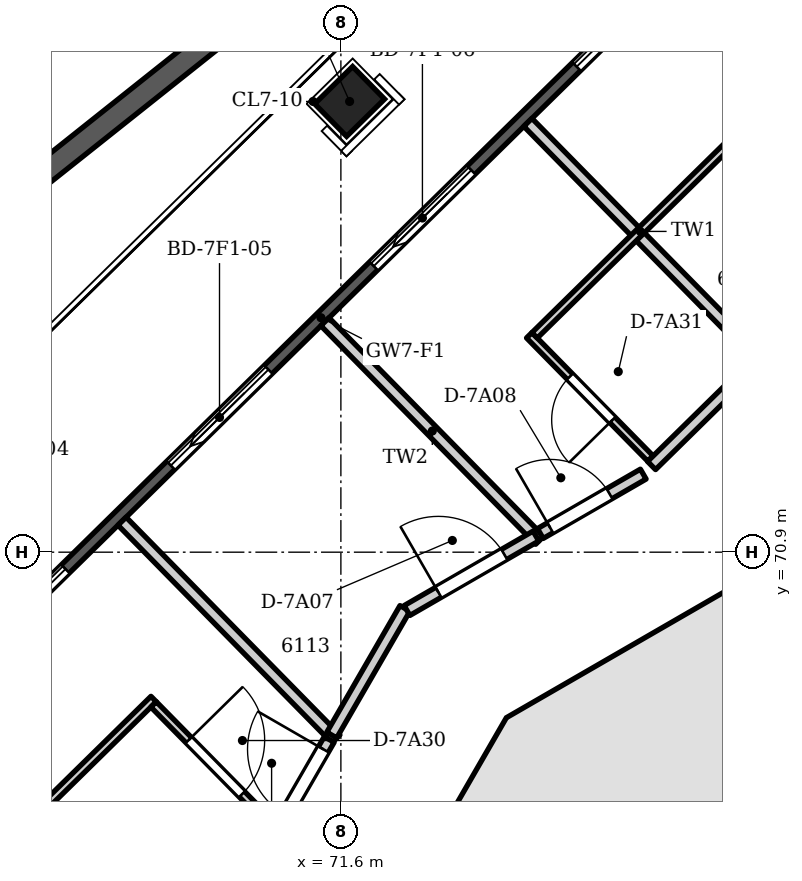
"""IFC4 building model, lengths in metres.
Left out: names, types, materials, properties, quantities, classifications, styles, units other than length and angle.
Written with IfcOpenShell. Run it as: python <this file> out.ifc"""

import sys

from ifc_helpers import new_model, si_unit, direction, frame, frame_2d, origin, origin_2d, place, context, subcontext, project, spatial, polyline, rectangle, outline, extrude, element, fill, save


model = new_model("IFC4")
c1 = context("Model", 3, precision=1e-05, world=origin(), true_north=direction((0.0, 1.0)))
c2 = subcontext(c1, "Body", "Model", "MODEL_VIEW")
j1 = project(units=[si_unit("LENGTHUNIT", "METRE"), si_unit("PLANEANGLEUNIT", "RADIAN")], contexts=[c1])
p1 = place(None, origin())
s1 = spatial("IfcSite", under=j1, at=p1, CompositionType="ELEMENT")
p2 = place(p1, origin())
s2 = spatial("IfcBuilding", under=s1, at=p2, CompositionType="ELEMENT")
p3 = place(p2, frame((0.0, 0.0, 234.9)))
s3 = spatial("IfcBuildingStorey", under=s2, at=p3, CompositionType="ELEMENT", Elevation=234.9)
p4 = place(p3, frame((77.897, 70.697, 0.0), z_axis=(0.0, 0.0, 1.0), x_axis=(-0.866034756103, -0.499983800959, 0.0)))
e1 = element("IfcWall", 1, at=p4, inside=s3, PredefinedType="SHEAR", context=c2, shape_type="SweptSolid", body=[
    extrude(outline(polyline([(0.0, -0.35), (4.555, -0.35), (4.368, 0.35), (0.188, 0.35), (0.0, -0.35)])), origin(), (0.0, 0.0, 1.0), 3.6),
])
p5 = place(p4, frame((0.642, 0.0, 0.0)))
e2 = element("IfcOpeningElement", 2, at=p5, cuts=e1, PredefinedType="OPENING", context=c2, shape_type="SweptSolid", body=[
    extrude(rectangle(XDim=0.9, YDim=2.1, at=frame_2d((0.45, 1.05))), frame((0.0, 0.36, 0.0), z_axis=(0.0, -1.0, 0.0), x_axis=(1.0, 0.0, 0.0)), (0.0, 0.0, 1.0), 0.72),
])
p6 = place(p3, frame((74.081, 68.548, 0.0), z_axis=(0.0, 0.0, 1.0), x_axis=(-0.499983800959, -0.866034756103, 0.0)))
e3 = element("IfcWall", 3, at=p6, inside=s3, PredefinedType="SHEAR", context=c2, shape_type="SweptSolid", body=[
    extrude(outline(polyline([(0.0, -0.35), (4.555, -0.35), (4.368, 0.35), (0.188, 0.35), (0.0, -0.35)])), origin(), (0.0, 0.0, 1.0), 3.6),
])
p7 = place(p6, frame((1.077, 0.0, 0.0)))
e4 = element("IfcOpeningElement", 4, at=p7, cuts=e3, PredefinedType="OPENING", context=c2, shape_type="SweptSolid", body=[
    extrude(rectangle(XDim=2.4, YDim=2.1, at=frame_2d((1.2, 1.05))), frame((0.0, 0.36, 0.0), z_axis=(0.0, -1.0, 0.0), x_axis=(1.0, 0.0, 0.0)), (0.0, 0.0, 1.0), 0.72),
])
p8 = place(p3, frame((77.731, 65.369, 0.0), z_axis=(0.0, 0.0, 1.0), x_axis=(-0.866035918664, 0.499981787252, 0.0)))
e5 = element("IfcWall", 5, at=p8, inside=s3, PredefinedType="SHEAR", context=c2, shape_type="SweptSolid", body=[
    extrude(rectangle(XDim=4.401, YDim=0.3, at=frame_2d((2.2, 0.0))), origin(), (0.0, 0.0, 1.0), 3.6),
])
p9 = place(p8, frame((1.351, 0.0, 0.0)))
e6 = element("IfcOpeningElement", 6, at=p9, cuts=e5, PredefinedType="OPENING", context=c2, shape_type="SweptSolid", body=[
    extrude(rectangle(XDim=1.0, YDim=2.1, at=frame_2d((0.5, 1.05))), frame((0.0, 0.16, 0.0), z_axis=(0.0, -1.0, 0.0), x_axis=(1.0, 0.0, 0.0)), (0.0, 0.0, 1.0), 0.32),
])
p10 = place(p3, frame((71.715, 76.83, -0.35), z_axis=(0.0, 0.0, 1.0), x_axis=(0.713250449154, 0.7009092643, 0.0)))
e7 = element("IfcColumn", 7, at=p10, inside=s3, PredefinedType="COLUMN", context=c2, shape_type="SweptSolid", body=[
    extrude(rectangle(XDim=0.7, YDim=0.6, at=origin_2d()), origin(), (0.0, 0.0, 1.0), 3.95),
])
p11 = place(p3, frame((57.99, 60.867, 0.0), z_axis=(0.0, 0.0, 1.0), x_axis=(0.713254682671, 0.700904956216, 0.0)))
e8 = element("IfcWall", 8, at=p11, inside=s3, PredefinedType="SOLIDWALL", context=c2, shape_type="SweptSolid", body=[
    extrude(outline(polyline([(0.149, 0.075), (0.149, -0.075), (33.537, -0.075), (33.537, 0.075), (0.149, 0.075)])), origin(), (0.0, 0.0, 1.0), 3.3),
])
p12 = place(p11, frame((1.171, 0.0, 0.0)))
e9 = element("IfcOpeningElement", 9, at=p12, cuts=e8, PredefinedType="OPENING", context=c2, shape_type="SweptSolid", body=[
    extrude(rectangle(XDim=1.8, YDim=2.6, at=frame_2d((0.9, 1.3))), frame((0.0, 0.085, 0.0), z_axis=(0.0, -1.0, 0.0), x_axis=(1.0, 0.0, 0.0)), (0.0, 0.0, 1.0), 0.17),
])
p13 = place(p11, frame((4.714, 0.0, 0.0)))
e10 = element("IfcOpeningElement", 10, at=p13, cuts=e8, PredefinedType="OPENING", context=c2, shape_type="SweptSolid", body=[
    extrude(rectangle(XDim=1.8, YDim=2.6, at=frame_2d((0.9, 1.3))), frame((0.0, 0.085, 0.0), z_axis=(0.0, -1.0, 0.0), x_axis=(1.0, 0.0, 0.0)), (0.0, 0.0, 1.0), 0.17),
])
p14 = place(p11, frame((8.457, 0.0, 0.0)))
e11 = element("IfcOpeningElement", 11, at=p14, cuts=e8, PredefinedType="OPENING", context=c2, shape_type="SweptSolid", body=[
    extrude(rectangle(XDim=1.8, YDim=2.6, at=frame_2d((0.9, 1.3))), frame((0.0, 0.085, 0.0), z_axis=(0.0, -1.0, 0.0), x_axis=(1.0, 0.0, 0.0)), (0.0, 0.0, 1.0), 0.17),
])
p15 = place(p11, frame((12.2, 0.0, 0.0)))
e12 = element("IfcOpeningElement", 12, at=p15, cuts=e8, PredefinedType="OPENING", context=c2, shape_type="SweptSolid", body=[
    extrude(rectangle(XDim=1.8, YDim=2.6, at=frame_2d((0.9, 1.3))), frame((0.0, 0.085, 0.0), z_axis=(0.0, -1.0, 0.0), x_axis=(1.0, 0.0, 0.0)), (0.0, 0.0, 1.0), 0.17),
])
p16 = place(p11, frame((15.943, 0.0, 0.0)))
e13 = element("IfcOpeningElement", 13, at=p16, cuts=e8, PredefinedType="OPENING", context=c2, shape_type="SweptSolid", body=[
    extrude(rectangle(XDim=1.8, YDim=2.6, at=frame_2d((0.9, 1.3))), frame((0.0, 0.085, 0.0), z_axis=(0.0, -1.0, 0.0), x_axis=(1.0, 0.0, 0.0)), (0.0, 0.0, 1.0), 0.17),
])
p17 = place(p11, frame((19.686, 0.0, 0.0)))
e14 = element("IfcOpeningElement", 14, at=p17, cuts=e8, PredefinedType="OPENING", context=c2, shape_type="SweptSolid", body=[
    extrude(rectangle(XDim=1.8, YDim=2.6, at=frame_2d((0.9, 1.3))), frame((0.0, 0.085, 0.0), z_axis=(0.0, -1.0, 0.0), x_axis=(1.0, 0.0, 0.0)), (0.0, 0.0, 1.0), 0.17),
])
p18 = place(p11, frame((23.429, 0.0, 0.0)))
e15 = element("IfcOpeningElement", 15, at=p18, cuts=e8, PredefinedType="OPENING", context=c2, shape_type="SweptSolid", body=[
    extrude(rectangle(XDim=1.8, YDim=2.6, at=frame_2d((0.9, 1.3))), frame((0.0, 0.085, 0.0), z_axis=(0.0, -1.0, 0.0), x_axis=(1.0, 0.0, 0.0)), (0.0, 0.0, 1.0), 0.17),
])
p19 = place(p11, frame((27.172, 0.0, 0.0)))
e16 = element("IfcOpeningElement", 16, at=p19, cuts=e8, PredefinedType="OPENING", context=c2, shape_type="SweptSolid", body=[
    extrude(rectangle(XDim=1.8, YDim=2.6, at=frame_2d((0.9, 1.3))), frame((0.0, 0.085, 0.0), z_axis=(0.0, -1.0, 0.0), x_axis=(1.0, 0.0, 0.0)), (0.0, 0.0, 1.0), 0.17),
])
p20 = place(p11, frame((30.715, 0.0, 0.0)))
e17 = element("IfcOpeningElement", 17, at=p20, cuts=e8, PredefinedType="OPENING", context=c2, shape_type="SweptSolid", body=[
    extrude(rectangle(XDim=1.8, YDim=2.6, at=frame_2d((0.9, 1.3))), frame((0.0, 0.085, 0.0), z_axis=(0.0, -1.0, 0.0), x_axis=(1.0, 0.0, 0.0)), (0.0, 0.0, 1.0), 0.17),
])
p21 = place(p3, origin())
e18 = element("IfcWall", 18, at=p21, inside=s3, PredefinedType="PARAPET", context=c2, shape_type="SweptSolid", body=[
    extrude(outline(polyline([(80.313, 86.12), (49.243, 61.406), (49.565, 61.279), (78.266, 84.108), (80.313, 86.12)])), origin(), (0.0, 0.0, 1.0), 1.1),
])
p22 = place(p3, frame((66.051, 68.685, 0.0), z_axis=(0.0, 0.0, 1.0), x_axis=(0.700808262034, -0.713349689748, 0.0)))
e19 = element("IfcWall", 19, at=p22, inside=s3, PredefinedType="PARTITIONING", context=c2, shape_type="SweptSolid", body=[
    extrude(rectangle(XDim=4.361, YDim=0.15, at=frame_2d((2.18, 0.0))), origin(), (0.0, 0.0, 1.0), 3.3),
])
p23 = place(p3, frame((67.479, 67.339, 0.0), z_axis=(0.0, 0.0, 1.0), x_axis=(0.713275639023, 0.700883629982, 0.0)))
e20 = element("IfcWall", 20, at=p23, inside=s3, PredefinedType="PARTITIONING", context=c2, shape_type="SweptSolid", body=[
    extrude(rectangle(XDim=2.325, YDim=0.1, at=frame_2d((1.162, 0.0))), origin(), (0.0, 0.0, 1.0), 3.3),
])
p24 = place(p3, frame((68.721, 71.308, 0.0), z_axis=(0.0, 0.0, 1.0), x_axis=(0.700815785944, -0.713342298039, 0.0)))
e21 = element("IfcWall", 21, at=p24, inside=s3, PredefinedType="PARTITIONING", context=c2, shape_type="SweptSolid", body=[
    extrude(rectangle(XDim=4.015, YDim=0.15, at=frame_2d((2.007, 0.0))), origin(), (0.0, 0.0, 1.0), 3.3),
])
p25 = place(p3, frame((69.136, 68.897, 0.0), z_axis=(0.0, 0.0, 1.0), x_axis=(0.701179250169, -0.712985034297, 0.0)))
e22 = element("IfcWall", 22, at=p25, inside=s3, PredefinedType="PARTITIONING", context=c2, shape_type="SweptSolid", body=[
    extrude(rectangle(XDim=2.316, YDim=0.1, at=frame_2d((1.158, 0.0))), origin(), (0.0, 0.0, 1.0), 3.3),
])
p26 = place(p25, frame((0.658, 0.0, 0.0)))
e23 = element("IfcOpeningElement", 23, at=p26, cuts=e22, PredefinedType="OPENING", context=c2, shape_type="SweptSolid", body=[
    extrude(rectangle(XDim=1.0, YDim=2.1, at=frame_2d((0.5, 1.05))), frame((0.0, 0.06, 0.0), z_axis=(0.0, -1.0, 0.0), x_axis=(1.0, 0.0, 0.0)), (0.0, 0.0, 1.0), 0.12),
])
p27 = place(p3, frame((70.758, 67.243, 0.0), z_axis=(0.0, 0.0, 1.0), x_axis=(0.49979916758, 0.866141323391, 0.0)))
e24 = element("IfcWall", 24, at=p27, inside=s3, PredefinedType="PARTITIONING", context=c2, shape_type="SweptSolid", body=[
    extrude(rectangle(XDim=1.377, YDim=0.15, at=frame_2d((0.689, 0.0))), origin(), (0.0, 0.0, 1.0), 3.3),
])
p28 = place(p27, frame((0.228, 0.0, 0.0)))
e25 = element("IfcOpeningElement", 25, at=p28, cuts=e24, PredefinedType="OPENING", context=c2, shape_type="SweptSolid", body=[
    extrude(rectangle(XDim=1.0, YDim=2.1, at=frame_2d((0.5, 1.05))), frame((0.0, 0.085, 0.0), z_axis=(0.0, -1.0, 0.0), x_axis=(1.0, 0.0, 0.0)), (0.0, 0.0, 1.0), 0.17),
])
p29 = place(p3, frame((71.39, 73.931, 0.0), z_axis=(0.0, 0.0, 1.0), x_axis=(0.700963396894, -0.713197249164, 0.0)))
e26 = element("IfcWall", 26, at=p29, inside=s3, PredefinedType="PARTITIONING", context=c2, shape_type="SweptSolid", body=[
    extrude(rectangle(XDim=4.031, YDim=0.15, at=frame_2d((2.016, 0.0))), origin(), (0.0, 0.0, 1.0), 3.3),
])
p30 = place(p3, frame((71.48, 68.494, 0.0), z_axis=(0.0, 0.0, 1.0), x_axis=(0.500205717672, 0.865906600049, 0.0)))
e27 = element("IfcWall", 27, at=p30, inside=s3, PredefinedType="PARTITIONING", context=c2, shape_type="SweptSolid", body=[
    extrude(rectangle(XDim=1.924, YDim=0.15, at=frame_2d((0.962, 0.0))), origin(), (0.0, 0.0, 1.0), 3.3),
])
p31 = place(p3, frame((72.47, 70.133, 0.0), z_axis=(0.0, 0.0, 1.0), x_axis=(0.865963449651, 0.500107292357, 0.0)))
e28 = element("IfcWall", 28, at=p31, inside=s3, PredefinedType="PARTITIONING", context=c2, shape_type="SweptSolid", body=[
    extrude(rectangle(XDim=1.958, YDim=0.15, at=frame_2d((0.979, 0.0))), origin(), (0.0, 0.0, 1.0), 3.3),
])
p32 = place(p31, frame((0.478, 0.0, 0.0)))
e29 = element("IfcOpeningElement", 29, at=p32, cuts=e28, PredefinedType="OPENING", context=c2, shape_type="SweptSolid", body=[
    extrude(rectangle(XDim=1.0, YDim=2.1, at=frame_2d((0.5, 1.05))), frame((0.0, 0.085, 0.0), z_axis=(0.0, -1.0, 0.0), x_axis=(1.0, 0.0, 0.0)), (0.0, 0.0, 1.0), 0.17),
])
p33 = place(p3, frame((74.06, 76.554, 0.0), z_axis=(0.0, 0.0, 1.0), x_axis=(0.70095501421, -0.713205487958, 0.0)))
e30 = element("IfcWall", 30, at=p33, inside=s3, PredefinedType="PARTITIONING", context=c2, shape_type="SweptSolid", body=[
    extrude(rectangle(XDim=4.285, YDim=0.15, at=frame_2d((2.142, 0.0))), origin(), (0.0, 0.0, 1.0), 3.3),
])
p34 = place(p3, frame((74.078, 73.754, 0.0), z_axis=(0.0, 0.0, 1.0), x_axis=(0.701016248593, -0.713145300207, 0.0)))
e31 = element("IfcWall", 31, at=p34, inside=s3, PredefinedType="PARTITIONING", context=c2, shape_type="SweptSolid", body=[
    extrude(rectangle(XDim=2.274, YDim=0.1, at=frame_2d((1.137, 0.0))), origin(), (0.0, 0.0, 1.0), 3.3),
])
p35 = place(p34, frame((0.762, 0.0, 0.0)))
e32 = element("IfcOpeningElement", 32, at=p35, cuts=e31, PredefinedType="OPENING", context=c2, shape_type="SweptSolid", body=[
    extrude(rectangle(XDim=0.8, YDim=2.1, at=frame_2d((0.4, 1.05))), frame((0.0, 0.06, 0.0), z_axis=(0.0, -1.0, 0.0), x_axis=(1.0, 0.0, 0.0)), (0.0, 0.0, 1.0), 0.12),
])
p36 = place(p3, frame((74.149, 73.753, 0.0), z_axis=(0.0, 0.0, 1.0), x_axis=(0.713214004819, 0.700946348396, 0.0)))
e33 = element("IfcWall", 33, at=p36, inside=s3, PredefinedType="PARTITIONING", context=c2, shape_type="SweptSolid", body=[
    extrude(rectangle(XDim=3.901, YDim=0.1, at=frame_2d((1.95, 0.0))), origin(), (0.0, 0.0, 1.0), 3.3),
])
p37 = place(p3, frame((74.224, 71.146, 0.0), z_axis=(0.0, 0.0, 1.0), x_axis=(0.866052944554, 0.499952294954, 0.0)))
e34 = element("IfcWall", 34, at=p37, inside=s3, PredefinedType="PARTITIONING", context=c2, shape_type="SweptSolid", body=[
    extrude(rectangle(XDim=1.563, YDim=0.15, at=frame_2d((0.782, 0.0))), origin(), (0.0, 0.0, 1.0), 3.3),
])
p38 = place(p37, frame((0.15, 0.0, 0.0)))
e35 = element("IfcOpeningElement", 35, at=p38, cuts=e34, PredefinedType="OPENING", context=c2, shape_type="SweptSolid", body=[
    extrude(rectangle(XDim=0.9, YDim=2.1, at=frame_2d((0.45, 1.05))), frame((0.0, 0.085, 0.0), z_axis=(0.0, -1.0, 0.0), x_axis=(1.0, 0.0, 0.0)), (0.0, 0.0, 1.0), 0.17),
])
p39 = place(p3, frame((75.687, 72.04, 0.0), z_axis=(0.0, 0.0, 1.0), x_axis=(0.713216712947, 0.700943592861, 0.0)))
e36 = element("IfcWall", 36, at=p39, inside=s3, PredefinedType="PARTITIONING", context=c2, shape_type="SweptSolid", body=[
    extrude(rectangle(XDim=13.487, YDim=0.15, at=frame_2d((6.744, 0.0))), origin(), (0.0, 0.0, 1.0), 2.75),
])
p40 = place(p39, frame((4.697, 0.0, 0.0)))
e37 = element("IfcOpeningElement", 37, at=p40, cuts=e36, PredefinedType="OPENING", context=c2, shape_type="SweptSolid", body=[
    extrude(rectangle(XDim=0.9, YDim=2.1, at=frame_2d((0.45, 1.05))), frame((0.0, 0.085, 0.0), z_axis=(0.0, -1.0, 0.0), x_axis=(1.0, 0.0, 0.0)), (0.0, 0.0, 1.0), 0.17),
])
p41 = place(p39, frame((5.897, 0.0, 0.0)))
e38 = element("IfcOpeningElement", 38, at=p41, cuts=e36, PredefinedType="OPENING", context=c2, shape_type="SweptSolid", body=[
    extrude(rectangle(XDim=0.9, YDim=2.1, at=frame_2d((0.45, 1.05))), frame((0.0, 0.085, 0.0), z_axis=(0.0, -1.0, 0.0), x_axis=(1.0, 0.0, 0.0)), (0.0, 0.0, 1.0), 0.17),
])
p42 = place(p39, frame((12.053, 0.0, 0.0)))
e39 = element("IfcOpeningElement", 39, at=p42, cuts=e36, PredefinedType="OPENING", context=c2, shape_type="SweptSolid", body=[
    extrude(rectangle(XDim=0.9, YDim=2.1, at=frame_2d((0.45, 1.05))), frame((0.0, 0.085, 0.0), z_axis=(0.0, -1.0, 0.0), x_axis=(1.0, 0.0, 0.0)), (0.0, 0.0, 1.0), 0.17),
])
p43 = place(p3, frame((75.251, 66.974, 0.0), z_axis=(0.0, 0.0, 1.0), x_axis=(0.500136062276, 0.86594683394, 0.0)))
e40 = element("IfcWall", 40, at=p43, inside=s3, PredefinedType="PARTITIONING", context=c2, shape_type="SweptSolid", body=[
    extrude(rectangle(XDim=2.299, YDim=0.2, at=frame_2d((1.149, 0.0))), origin(), (0.0, 0.0, 1.0), 3.3),
])
p44 = place(p3, frame((78.225, 68.028, 0.0), z_axis=(0.0, 0.0, 1.0), x_axis=(-0.866130725101, 0.499817533742, 0.0)))
e41 = element("IfcWall", 41, at=p44, inside=s3, PredefinedType="PARTITIONING", context=c2, shape_type="SweptSolid", body=[
    extrude(rectangle(XDim=2.149, YDim=0.2, at=frame_2d((1.074, 0.0))), origin(), (0.0, 0.0, 1.0), 3.3),
])
p45 = place(p15, origin())
e42 = element("IfcDoor", 42, at=p45, inside=s3, OperationType="SLIDING_TO_LEFT", PredefinedType="DOOR", context=c2, shape_type="SweptSolid", body=[
    extrude(rectangle(XDim=1.8, YDim=2.6, at=frame_2d((0.9, 1.3))), frame((0.0, 0.025, 0.0), z_axis=(0.0, -1.0, 0.0), x_axis=(1.0, 0.0, 0.0)), (0.0, 0.0, 1.0), 0.05),
])
fill(e12, e42)
p46 = place(p16, origin())
e43 = element("IfcDoor", 43, at=p46, inside=s3, OperationType="SLIDING_TO_LEFT", PredefinedType="DOOR", context=c2, shape_type="SweptSolid", body=[
    extrude(rectangle(XDim=1.8, YDim=2.6, at=frame_2d((0.9, 1.3))), frame((0.0, 0.025, 0.0), z_axis=(0.0, -1.0, 0.0), x_axis=(1.0, 0.0, 0.0)), (0.0, 0.0, 1.0), 0.05),
])
fill(e13, e43)
p47 = place(p17, origin())
e44 = element("IfcDoor", 44, at=p47, inside=s3, OperationType="SLIDING_TO_LEFT", PredefinedType="DOOR", context=c2, shape_type="SweptSolid", body=[
    extrude(rectangle(XDim=1.8, YDim=2.6, at=frame_2d((0.9, 1.3))), frame((0.0, 0.025, 0.0), z_axis=(0.0, -1.0, 0.0), x_axis=(1.0, 0.0, 0.0)), (0.0, 0.0, 1.0), 0.05),
])
fill(e14, e44)
p48 = place(p18, origin())
e45 = element("IfcDoor", 45, at=p48, inside=s3, OperationType="SLIDING_TO_LEFT", PredefinedType="DOOR", context=c2, shape_type="SweptSolid", body=[
    extrude(rectangle(XDim=1.8, YDim=2.6, at=frame_2d((0.9, 1.3))), frame((0.0, 0.025, 0.0), z_axis=(0.0, -1.0, 0.0), x_axis=(1.0, 0.0, 0.0)), (0.0, 0.0, 1.0), 0.05),
])
fill(e15, e45)
p49 = place(p28, origin())
e46 = element("IfcDoor", 46, at=p49, inside=s3, OperationType="SINGLE_SWING_RIGHT", PredefinedType="DOOR", context=c2, shape_type="SweptSolid", body=[
    extrude(rectangle(XDim=1.0, YDim=2.1, at=frame_2d((0.5, 1.05))), frame((0.0, 0.025, 0.0), z_axis=(0.0, -1.0, 0.0), x_axis=(1.0, 0.0, 0.0)), (0.0, 0.0, 1.0), 0.05),
])
fill(e25, e46)
p50 = place(p32, origin())
e47 = element("IfcDoor", 47, at=p50, inside=s3, OperationType="SINGLE_SWING_LEFT", PredefinedType="DOOR", context=c2, shape_type="SweptSolid", body=[
    extrude(rectangle(XDim=1.0, YDim=2.1, at=frame_2d((0.5, 1.05))), frame((0.0, 0.025, 0.0), z_axis=(0.0, -1.0, 0.0), x_axis=(1.0, 0.0, 0.0)), (0.0, 0.0, 1.0), 0.05),
])
fill(e29, e47)
p51 = place(p38, origin())
e48 = element("IfcDoor", 48, at=p51, inside=s3, OperationType="SINGLE_SWING_LEFT", PredefinedType="DOOR", context=c2, shape_type="SweptSolid", body=[
    extrude(rectangle(XDim=0.9, YDim=2.1, at=frame_2d((0.45, 1.05))), frame((0.0, 0.025, 0.0), z_axis=(0.0, -1.0, 0.0), x_axis=(1.0, 0.0, 0.0)), (0.0, 0.0, 1.0), 0.05),
])
fill(e35, e48)
p52 = place(p26, origin())
e49 = element("IfcDoor", 49, at=p52, inside=s3, OperationType="SINGLE_SWING_LEFT", PredefinedType="DOOR", context=c2, shape_type="SweptSolid", body=[
    extrude(rectangle(XDim=1.0, YDim=2.1, at=frame_2d((0.5, 1.05))), frame((0.0, 0.025, 0.0), z_axis=(0.0, -1.0, 0.0), x_axis=(1.0, 0.0, 0.0)), (0.0, 0.0, 1.0), 0.05),
])
fill(e23, e49)
p53 = place(p35, frame((0.8, 0.0, 0.0), z_axis=(0.0, 0.0, 1.0), x_axis=(-1.0, 0.0, 0.0)))
e50 = element("IfcDoor", 50, at=p53, inside=s3, OperationType="SINGLE_SWING_LEFT", PredefinedType="DOOR", context=c2, shape_type="SweptSolid", body=[
    extrude(rectangle(XDim=0.8, YDim=2.1, at=frame_2d((0.4, 1.05))), frame((0.0, 0.025, 0.0), z_axis=(0.0, -1.0, 0.0), x_axis=(1.0, 0.0, 0.0)), (0.0, 0.0, 1.0), 0.05),
])
fill(e32, e50)
p54 = place(p7, origin())
e51 = element("IfcDoor", 51, at=p54, inside=s3, OperationType="DOUBLE_DOOR_SINGLE_SWING", PredefinedType="DOOR", context=c2, shape_type="SweptSolid", body=[
    extrude(rectangle(XDim=2.4, YDim=2.1, at=frame_2d((1.2, 1.05))), frame((0.0, 0.025, 0.0), z_axis=(0.0, -1.0, 0.0), x_axis=(1.0, 0.0, 0.0)), (0.0, 0.0, 1.0), 0.05),
])
fill(e4, e51)
p55 = place(p5, origin())
e52 = element("IfcDoor", 52, at=p55, inside=s3, OperationType="SINGLE_SWING_LEFT", PredefinedType="DOOR", context=c2, shape_type="SweptSolid", body=[
    extrude(rectangle(XDim=0.9, YDim=2.1, at=frame_2d((0.45, 1.05))), frame((0.0, 0.075, 0.0), z_axis=(0.0, -1.0, 0.0), x_axis=(1.0, 0.0, 0.0)), (0.0, 0.0, 1.0), 0.05),
])
fill(e2, e52)
save(model, sys.argv[1])
